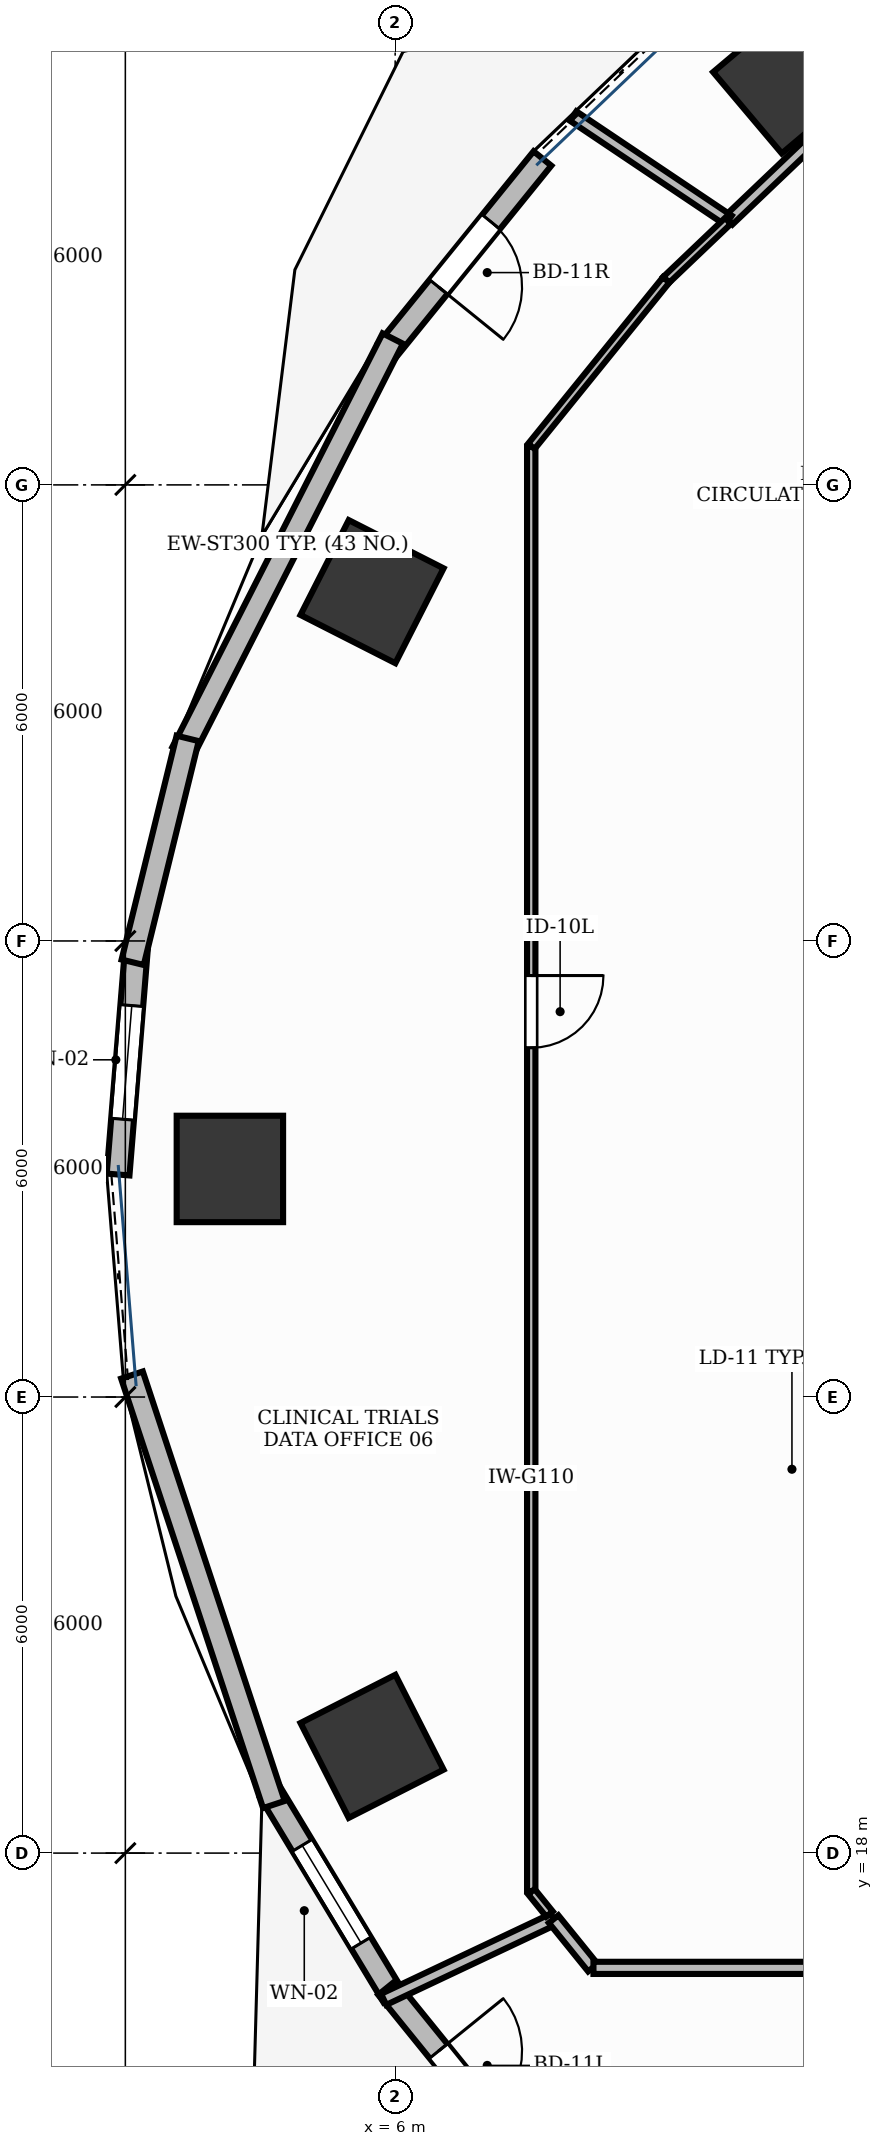
"""IFC4 building model, lengths in metres.
Left out: names, types, materials, properties, quantities, classifications, styles, units other than length and angle.
Written with IfcOpenShell. Run it as: python <this file> out.ifc"""

import sys

from ifc_helpers import new_model, si_unit, direction, frame, frame_2d, origin, origin_2d, place, context, subcontext, project, spatial, rectangle, extrude, element, fill, save


model = new_model("IFC4")
c1 = context("Model", 3, precision=1e-05, world=origin(), true_north=direction((0.0, 1.0)))
c2 = subcontext(c1, "Body", "Model", "MODEL_VIEW")
j1 = project(units=[si_unit("LENGTHUNIT", "METRE"), si_unit("PLANEANGLEUNIT", "RADIAN")], contexts=[c1])
p1 = place(None, origin())
s1 = spatial("IfcSite", under=j1, at=p1, CompositionType="ELEMENT")
p2 = place(p1, origin())
s2 = spatial("IfcBuilding", under=s1, at=p2, CompositionType="ELEMENT")
p3 = place(p2, frame((0.0, 0.0, 63.6)))
s3 = spatial("IfcBuildingStorey", under=s2, at=p3, CompositionType="ELEMENT", Elevation=63.6)
for number, where, z_axis, x_axis in (
    (1, (11.17, 41.347, -0.0), (0.0, 0.0, 1.0), (0.764, 0.645, 0.0)),
    (2, (5.696, 34.596, -0.0), (0.0, 0.0, 1.0), (0.453, 0.891, 0.0)),
    (3, (3.825, 27.001, -0.0), (0.0, 0.0, 1.0), (0.0, 1.0, 0.0)),
    (4, (5.696, 19.404, -0.0), (0.0, 0.0, 1.0), (-0.453, 0.891, 0.0)),
):
    element("IfcColumn", number, at=place(p3, frame(where, z_axis=z_axis, x_axis=x_axis)), inside=s3, PredefinedType="COLUMN", context=c2, shape_type="SweptSolid", body=[
        extrude(rectangle(XDim=1.4, YDim=1.4, at=origin_2d()), origin(), (0.0, 0.0, 1.0), 3.901),
    ])
p4 = place(p3, frame((7.938, 40.294, 0.0), z_axis=(0.0, 0.0, 1.0), x_axis=(-0.629295540187, -0.777166084631, 0.0)))
e5 = element("IfcWall", 5, at=p4, inside=s3, PredefinedType="STANDARD", context=c2, shape_type="SweptSolid", body=[
    extrude(rectangle(XDim=3.248, YDim=0.3, at=frame_2d((1.624, 0.0))), origin(), (0.0, 0.0, 1.0), 3.9),
])
p5 = place(p4, frame((1.074, 0.0, 0.0)))
e6 = element("IfcOpeningElement", 6, at=p5, cuts=e5, PredefinedType="OPENING", context=c2, shape_type="SweptSolid", body=[
    extrude(rectangle(XDim=1.1, YDim=2.15, at=frame_2d((0.55, 1.075))), frame((0.0, 0.165, 0.0), z_axis=(0.0, -1.0, 0.0), x_axis=(1.0, 0.0, 0.0)), (0.0, 0.0, 1.0), 0.33),
])
p6 = place(p3, frame((2.594, 29.878, 0.0), z_axis=(0.0, 0.0, 1.0), x_axis=(-0.08090887827, -0.996721502435, 0.0)))
e7 = element("IfcWall", 7, at=p6, inside=s3, PredefinedType="STANDARD", context=c2, shape_type="SweptSolid", body=[
    extrude(rectangle(XDim=2.96, YDim=0.3, at=frame_2d((1.48, 0.0))), origin(), (0.0, 0.0, 1.0), 3.47),
])
p7 = place(p6, frame((0.73, 0.0, 0.95)))
e8 = element("IfcOpeningElement", 8, at=p7, cuts=e7, PredefinedType="OPENING", context=c2, shape_type="SweptSolid", body=[
    extrude(rectangle(XDim=1.5, YDim=1.8, at=frame_2d((0.75, 0.9))), frame((0.0, 0.165, 0.0), z_axis=(0.0, -1.0, 0.0), x_axis=(1.0, 0.0, 0.0)), (0.0, 0.0, 1.0), 0.33),
])
p8 = place(p3, frame((4.352, 18.805, 0.0), z_axis=(0.0, 0.0, 1.0), x_axis=(0.516447962267, -0.856318575222, 0.0)))
e9 = element("IfcWall", 9, at=p8, inside=s3, PredefinedType="STANDARD", context=c2, shape_type="SweptSolid", body=[
    extrude(rectangle(XDim=3.143, YDim=0.3, at=frame_2d((1.571, 0.0))), origin(), (0.0, 0.0, 1.0), 3.9),
])
p9 = place(p8, frame((0.821, 0.0, 0.95)))
e10 = element("IfcOpeningElement", 10, at=p9, cuts=e9, PredefinedType="OPENING", context=c2, shape_type="SweptSolid", body=[
    extrude(rectangle(XDim=1.5, YDim=1.8, at=frame_2d((0.75, 0.9))), frame((0.0, 0.165, 0.0), z_axis=(0.0, -1.0, 0.0), x_axis=(1.0, 0.0, 0.0)), (0.0, 0.0, 1.0), 0.33),
])
p10 = place(p3, frame((5.894, 16.23, 0.0), z_axis=(0.0, 0.0, 1.0), x_axis=(0.629295540187, -0.777166084631, 0.0)))
e11 = element("IfcWall", 11, at=p10, inside=s3, PredefinedType="STANDARD", context=c2, shape_type="SweptSolid", body=[
    extrude(rectangle(XDim=3.248, YDim=0.3, at=frame_2d((1.624, 0.0))), origin(), (0.0, 0.0, 1.0), 3.9),
])
p11 = place(p10, frame((1.074, 0.0, 0.0)))
e12 = element("IfcOpeningElement", 12, at=p11, cuts=e11, PredefinedType="OPENING", context=c2, shape_type="SweptSolid", body=[
    extrude(rectangle(XDim=1.1, YDim=2.15, at=frame_2d((0.55, 1.075))), frame((0.0, 0.165, 0.0), z_axis=(0.0, -1.0, 0.0), x_axis=(1.0, 0.0, 0.0)), (0.0, 0.0, 1.0), 0.33),
])
p12 = place(p3, frame((5.969, 37.926, 0.0), z_axis=(0.0, 0.0, 1.0), x_axis=(-0.453093111502, -0.891463197395, 0.0)))
e13 = element("IfcWall", 13, at=p12, inside=s3, PredefinedType="STANDARD", context=c2, shape_type="SweptSolid", body=[
    extrude(rectangle(XDim=6.102, YDim=0.3, at=frame_2d((3.051, 0.0))), origin(), (0.0, 0.0, 1.0), 3.47),
])
p13 = place(p3, frame((3.27, 32.665, 0.0), z_axis=(0.0, 0.0, 1.0), x_axis=(-0.23859399274, -0.971119409047, 0.0)))
e14 = element("IfcWall", 14, at=p13, inside=s3, PredefinedType="STANDARD", context=c2, shape_type="SweptSolid", body=[
    extrude(rectangle(XDim=3.033, YDim=0.3, at=frame_2d((1.517, 0.0))), origin(), (0.0, 0.0, 1.0), 3.47),
])
p14 = place(p3, frame((2.537, 24.289, 0.0), z_axis=(0.0, 0.0, 1.0), x_axis=(0.31372816724, -0.949512841978, 0.0)))
e15 = element("IfcWall", 15, at=p14, inside=s3, PredefinedType="STANDARD", context=c2, shape_type="SweptSolid", body=[
    extrude(rectangle(XDim=5.951, YDim=0.3, at=frame_2d((2.976, 0.0))), origin(), (0.0, 0.0, 1.0), 3.9),
])
p15 = place(p3, frame((7.79, 36.501, 0.0), z_axis=(0.0, 0.0, 1.0), x_axis=(0.0, -1.0, 0.0)))
e16 = element("IfcWall", 16, at=p15, inside=s3, PredefinedType="MOVABLE", context=c2, shape_type="SweptSolid", body=[
    extrude(rectangle(XDim=19.002, YDim=0.11, at=frame_2d((9.501, 0.0))), origin(), (0.0, 0.0, 1.0), 2.91),
])
p16 = place(p15, frame((6.956, 0.0, 0.0)))
e17 = element("IfcOpeningElement", 17, at=p16, cuts=e16, PredefinedType="OPENING", context=c2, shape_type="SweptSolid", body=[
    extrude(rectangle(XDim=0.95, YDim=2.15, at=frame_2d((0.475, 1.075))), frame((0.0, 0.07, 0.0), z_axis=(0.0, -1.0, 0.0), x_axis=(1.0, 0.0, 0.0)), (0.0, 0.0, 1.0), 0.14),
])
p17 = place(p3, frame((5.848, 16.076, 0.0), z_axis=(0.0, 0.0, 1.0), x_axis=(0.904251823465, 0.426999578173, 0.0)))
e18 = element("IfcWall", 18, at=p17, inside=s3, PredefinedType="PARTITIONING", context=c2, shape_type="SweptSolid", body=[
    extrude(rectangle(XDim=2.473, YDim=0.16, at=frame_2d((1.236, 0.0))), origin(), (0.0, 0.0, 1.0), 2.91),
])
p18 = place(p3, frame((8.084, 17.132, 0.0), z_axis=(0.0, 0.0, 1.0), x_axis=(0.629146883335, -0.77728643317, 0.0)))
e19 = element("IfcWall", 19, at=p18, inside=s3, PredefinedType="PARTITIONING", context=c2, shape_type="SweptSolid", body=[
    extrude(rectangle(XDim=0.821, YDim=0.16, at=frame_2d((0.41, 0.0))), origin(), (0.0, 0.0, 1.0), 2.91),
])
p19 = place(p3, frame((8.609, 16.49, 0.0), z_axis=(0.0, 0.0, 1.0), x_axis=(1.0, 0.0, 0.0)))
e20 = element("IfcWall", 20, at=p19, inside=s3, PredefinedType="PARTITIONING", context=c2, shape_type="SweptSolid", body=[
    extrude(rectangle(XDim=2.971, YDim=0.16, at=frame_2d((1.486, 0.0))), origin(), (0.0, 0.0, 1.0), 2.91),
])
p20 = place(p3, frame((11.693, 40.727, 0.0), z_axis=(0.0, 0.0, 1.0), x_axis=(-0.723662214514, -0.690154330048, 0.0)))
e21 = element("IfcWall", 21, at=p20, inside=s3, PredefinedType="PARTITIONING", context=c2, shape_type="SweptSolid", body=[
    extrude(rectangle(XDim=1.807, YDim=0.15, at=frame_2d((0.903, 0.0))), origin(), (0.0, 0.0, 1.0), 2.91),
])
p21 = place(p3, frame((10.386, 39.48, 0.0), z_axis=(0.0, 0.0, 1.0), x_axis=(-0.830276202789, 0.557352157152, 0.0)))
e22 = element("IfcWall", 22, at=p21, inside=s3, PredefinedType="PARTITIONING", context=c2, shape_type="SweptSolid", body=[
    extrude(rectangle(XDim=2.462, YDim=0.15, at=frame_2d((1.231, 0.0))), origin(), (0.0, 0.0, 1.0), 2.91),
])
p22 = place(p3, frame((10.378, 39.473, 0.0), z_axis=(0.0, 0.0, 1.0), x_axis=(-0.723760277906, -0.690051490924, 0.0)))
e23 = element("IfcWall", 23, at=p22, inside=s3, PredefinedType="MOVABLE", context=c2, shape_type="SweptSolid", body=[
    extrude(rectangle(XDim=1.123, YDim=0.11, at=frame_2d((0.561, 0.0))), origin(), (0.0, 0.0, 1.0), 2.91),
])
p23 = place(p3, frame((9.565, 38.697, 0.0), z_axis=(0.0, 0.0, 1.0), x_axis=(-0.629270515505, -0.777186347227, 0.0)))
e24 = element("IfcWall", 24, at=p23, inside=s3, PredefinedType="MOVABLE", context=c2, shape_type="SweptSolid", body=[
    extrude(rectangle(XDim=2.817, YDim=0.11, at=frame_2d((1.409, 0.0))), origin(), (0.0, 0.0, 1.0), 2.91),
])
p24 = place(p3, frame((7.792, 17.492, 0.0), z_axis=(0.0, 0.0, 1.0), x_axis=(0.629086970035, -0.77733492404, 0.0)))
e25 = element("IfcWall", 25, at=p24, inside=s3, PredefinedType="MOVABLE", context=c2, shape_type="SweptSolid", body=[
    extrude(rectangle(XDim=0.379, YDim=0.11, at=frame_2d((0.189, 0.0))), origin(), (0.0, 0.0, 1.0), 2.91),
])
p25 = place(p5, origin())
e26 = element("IfcDoor", 26, at=p25, inside=s3, OperationType="SINGLE_SWING_RIGHT", PredefinedType="DOOR", context=c2, shape_type="SweptSolid", body=[
    extrude(rectangle(XDim=1.1, YDim=2.15, at=frame_2d((0.55, 1.075))), frame((0.0, 0.025, 0.0), z_axis=(0.0, -1.0, 0.0), x_axis=(1.0, 0.0, 0.0)), (0.0, 0.0, 1.0), 0.05),
])
fill(e6, e26)
p26 = place(p7, origin())
e27 = element("IfcWindow", 27, at=p26, inside=s3, PartitioningType="DOUBLE_PANEL_VERTICAL", PredefinedType="WINDOW", context=c2, shape_type="SweptSolid", body=[
    extrude(rectangle(XDim=1.5, YDim=1.8, at=frame_2d((0.75, 0.9))), frame((0.0, 0.03, 0.0), z_axis=(0.0, -1.0, 0.0), x_axis=(1.0, 0.0, 0.0)), (0.0, 0.0, 1.0), 0.06),
])
fill(e8, e27)
p27 = place(p9, origin())
e28 = element("IfcWindow", 28, at=p27, inside=s3, PartitioningType="DOUBLE_PANEL_VERTICAL", PredefinedType="WINDOW", context=c2, shape_type="SweptSolid", body=[
    extrude(rectangle(XDim=1.5, YDim=1.8, at=frame_2d((0.75, 0.9))), frame((0.0, 0.03, 0.0), z_axis=(0.0, -1.0, 0.0), x_axis=(1.0, 0.0, 0.0)), (0.0, 0.0, 1.0), 0.06),
])
fill(e10, e28)
p28 = place(p11, origin())
e29 = element("IfcDoor", 29, at=p28, inside=s3, OperationType="SINGLE_SWING_LEFT", PredefinedType="DOOR", context=c2, shape_type="SweptSolid", body=[
    extrude(rectangle(XDim=1.1, YDim=2.15, at=frame_2d((0.55, 1.075))), frame((0.0, 0.025, 0.0), z_axis=(0.0, -1.0, 0.0), x_axis=(1.0, 0.0, 0.0)), (0.0, 0.0, 1.0), 0.05),
])
fill(e12, e29)
p29 = place(p16, origin())
e30 = element("IfcDoor", 30, at=p29, inside=s3, OperationType="SINGLE_SWING_LEFT", PredefinedType="DOOR", context=c2, shape_type="SweptSolid", body=[
    extrude(rectangle(XDim=0.95, YDim=2.15, at=frame_2d((0.475, 1.075))), frame((0.0, 0.025, 0.0), z_axis=(0.0, -1.0, 0.0), x_axis=(1.0, 0.0, 0.0)), (0.0, 0.0, 1.0), 0.05),
])
fill(e17, e30)
save(model, sys.argv[1])
